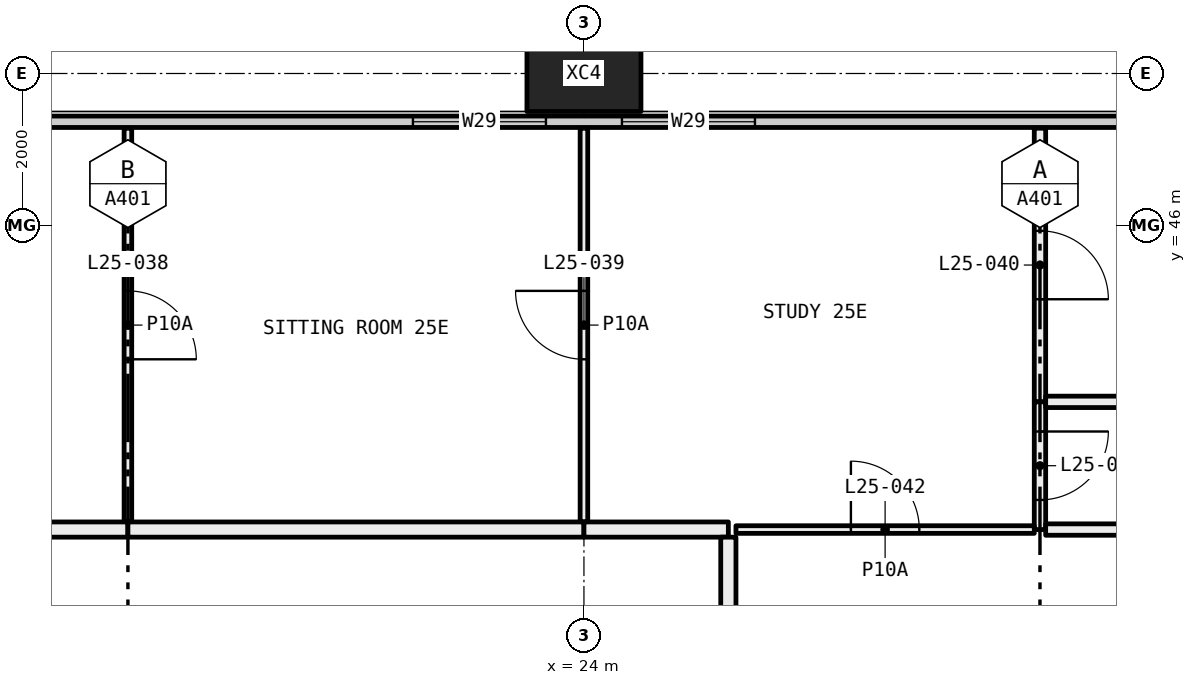
"""IFC4 building model, lengths in metres.
Left out: names, types, materials, properties, quantities, classifications, styles, units other than length and angle.
Written with IfcOpenShell. Run it as: python <this file> out.ifc"""

import sys

from ifc_helpers import new_model, si_unit, direction, frame, frame_2d, origin, origin_2d, place, context, subcontext, project, spatial, rectangle, hollow_rectangle, extrude, element, fill, save


model = new_model("IFC4")
c1 = context("Model", 3, precision=1e-05, world=origin(), true_north=direction((0.0, 1.0)))
c2 = subcontext(c1, "Body", "Model", "MODEL_VIEW")
j1 = project(units=[si_unit("LENGTHUNIT", "METRE"), si_unit("PLANEANGLEUNIT", "RADIAN")], contexts=[c1])
p1 = place(None, origin())
s1 = spatial("IfcSite", under=j1, at=p1, CompositionType="ELEMENT")
p2 = place(p1, origin())
s2 = spatial("IfcBuilding", under=s1, at=p2, CompositionType="ELEMENT")
p3 = place(p2, frame((0.0, 0.0, 100.05)))
s3 = spatial("IfcBuildingStorey", under=s2, at=p3, CompositionType="ELEMENT", Elevation=100.05)
p4 = place(p3, frame((24.0, 48.0, -0.4), z_axis=(0.0, 0.0, 1.0), x_axis=(1.0, 0.0, 0.0)))
e1 = element("IfcColumn", 1, at=p4, inside=s3, PredefinedType="COLUMN", context=c2, shape_type="SweptSolid", body=[
    extrude(hollow_rectangle(XDim=1.5, YDim=1.0, WallThickness=0.06, at=origin_2d()), origin(), (0.0, 0.0, 1.0), 3.45),
])
p5 = place(p3, frame((6.56, 47.365, 0.0), z_axis=(0.0, 0.0, 1.0), x_axis=(1.0, 0.0, 0.0)))
e2 = element("IfcWall", 2, at=p5, inside=s3, PredefinedType="ELEMENTEDWALL", context=c2, shape_type="SweptSolid", body=[
    extrude(rectangle(XDim=58.88, YDim=0.15, at=frame_2d((29.44, 0.0))), origin(), (0.0, 0.0, 1.0), 3.05),
])
p6 = place(p5, frame((0.44, 0.0, 0.45)))
e3 = element("IfcOpeningElement", 3, at=p6, cuts=e2, PredefinedType="OPENING", context=c2, shape_type="SweptSolid", body=[
    extrude(rectangle(XDim=4.5, YDim=2.55, at=frame_2d((2.25, 1.275))), frame((0.0, 0.085, 0.0), z_axis=(0.0, -1.0, 0.0), x_axis=(1.0, 0.0, 0.0)), (0.0, 0.0, 1.0), 0.17),
])
p7 = place(p5, frame((5.94, 0.0, 0.45)))
e4 = element("IfcOpeningElement", 4, at=p7, cuts=e2, PredefinedType="OPENING", context=c2, shape_type="SweptSolid", body=[
    extrude(rectangle(XDim=1.75, YDim=2.55, at=frame_2d((0.875, 1.275))), frame((0.0, 0.085, 0.0), z_axis=(0.0, -1.0, 0.0), x_axis=(1.0, 0.0, 0.0)), (0.0, 0.0, 1.0), 0.17),
])
p8 = place(p5, frame((15.19, 0.0, 0.45)))
e5 = element("IfcOpeningElement", 5, at=p8, cuts=e2, PredefinedType="OPENING", context=c2, shape_type="SweptSolid", body=[
    extrude(rectangle(XDim=1.75, YDim=2.55, at=frame_2d((0.875, 1.275))), frame((0.0, 0.085, 0.0), z_axis=(0.0, -1.0, 0.0), x_axis=(1.0, 0.0, 0.0)), (0.0, 0.0, 1.0), 0.17),
])
p9 = place(p5, frame((17.94, 0.0, 0.45)))
e6 = element("IfcOpeningElement", 6, at=p9, cuts=e2, PredefinedType="OPENING", context=c2, shape_type="SweptSolid", body=[
    extrude(rectangle(XDim=1.75, YDim=2.55, at=frame_2d((0.875, 1.275))), frame((0.0, 0.085, 0.0), z_axis=(0.0, -1.0, 0.0), x_axis=(1.0, 0.0, 0.0)), (0.0, 0.0, 1.0), 0.17),
])
p10 = place(p5, frame((27.19, 0.0, 0.45)))
e7 = element("IfcOpeningElement", 7, at=p10, cuts=e2, PredefinedType="OPENING", context=c2, shape_type="SweptSolid", body=[
    extrude(rectangle(XDim=1.75, YDim=2.55, at=frame_2d((0.875, 1.275))), frame((0.0, 0.085, 0.0), z_axis=(0.0, -1.0, 0.0), x_axis=(1.0, 0.0, 0.0)), (0.0, 0.0, 1.0), 0.17),
])
p11 = place(p5, frame((29.94, 0.0, 0.45)))
e8 = element("IfcOpeningElement", 8, at=p11, cuts=e2, PredefinedType="OPENING", context=c2, shape_type="SweptSolid", body=[
    extrude(rectangle(XDim=1.75, YDim=2.55, at=frame_2d((0.875, 1.275))), frame((0.0, 0.085, 0.0), z_axis=(0.0, -1.0, 0.0), x_axis=(1.0, 0.0, 0.0)), (0.0, 0.0, 1.0), 0.17),
])
p12 = place(p5, frame((39.19, 0.0, 0.45)))
e9 = element("IfcOpeningElement", 9, at=p12, cuts=e2, PredefinedType="OPENING", context=c2, shape_type="SweptSolid", body=[
    extrude(rectangle(XDim=1.75, YDim=2.55, at=frame_2d((0.875, 1.275))), frame((0.0, 0.085, 0.0), z_axis=(0.0, -1.0, 0.0), x_axis=(1.0, 0.0, 0.0)), (0.0, 0.0, 1.0), 0.17),
])
p13 = place(p5, frame((41.94, 0.0, 0.45)))
e10 = element("IfcOpeningElement", 10, at=p13, cuts=e2, PredefinedType="OPENING", context=c2, shape_type="SweptSolid", body=[
    extrude(rectangle(XDim=1.75, YDim=2.55, at=frame_2d((0.875, 1.275))), frame((0.0, 0.085, 0.0), z_axis=(0.0, -1.0, 0.0), x_axis=(1.0, 0.0, 0.0)), (0.0, 0.0, 1.0), 0.17),
])
p14 = place(p5, frame((51.19, 0.0, 0.45)))
e11 = element("IfcOpeningElement", 11, at=p14, cuts=e2, PredefinedType="OPENING", context=c2, shape_type="SweptSolid", body=[
    extrude(rectangle(XDim=1.75, YDim=2.55, at=frame_2d((0.875, 1.275))), frame((0.0, 0.085, 0.0), z_axis=(0.0, -1.0, 0.0), x_axis=(1.0, 0.0, 0.0)), (0.0, 0.0, 1.0), 0.17),
])
p15 = place(p5, frame((53.94, 0.0, 0.45)))
e12 = element("IfcOpeningElement", 12, at=p15, cuts=e2, PredefinedType="OPENING", context=c2, shape_type="SweptSolid", body=[
    extrude(rectangle(XDim=4.5, YDim=2.55, at=frame_2d((2.25, 1.275))), frame((0.0, 0.085, 0.0), z_axis=(0.0, -1.0, 0.0), x_axis=(1.0, 0.0, 0.0)), (0.0, 0.0, 1.0), 0.17),
])
p16 = place(p3, frame((18.0, 42.1, 0.0), z_axis=(0.0, 0.0, 1.0), x_axis=(0.0, 1.0, 0.0)))
e13 = element("IfcWall", 13, at=p16, inside=s3, PredefinedType="PARTITIONING", context=c2, shape_type="SweptSolid", body=[
    extrude(rectangle(XDim=5.18, YDim=0.1, at=frame_2d((2.59, 0.0))), origin(), (0.0, 0.0, 1.0), 3.05),
])
p17 = place(p16, frame((2.14, 0.0, 0.0)))
e14 = element("IfcOpeningElement", 14, at=p17, cuts=e13, PredefinedType="OPENING", context=c2, shape_type="SweptSolid", body=[
    extrude(rectangle(XDim=0.9, YDim=2.1, at=frame_2d((0.45, 1.05))), frame((0.0, 0.06, 0.0), z_axis=(0.0, -1.0, 0.0), x_axis=(1.0, 0.0, 0.0)), (0.0, 0.0, 1.0), 0.12),
])
p18 = place(p3, frame((12.0, 42.0, 0.0), z_axis=(0.0, 0.0, 1.0), x_axis=(1.0, 0.0, 0.0)))
e15 = element("IfcWall", 15, at=p18, inside=s3, PredefinedType="PARTITIONING", context=c2, shape_type="SweptSolid", body=[
    extrude(rectangle(XDim=6.0, YDim=0.2, at=frame_2d((3.0, 0.0))), origin(), (0.0, 0.0, 1.0), 3.05),
])
p19 = place(p18, frame((2.5, 0.0, 0.0)))
e16 = element("IfcOpeningElement", 16, at=p19, cuts=e15, PredefinedType="OPENING", context=c2, shape_type="SweptSolid", body=[
    extrude(rectangle(XDim=1.0, YDim=2.1, at=frame_2d((0.5, 1.05))), frame((0.0, 0.11, 0.0), z_axis=(0.0, -1.0, 0.0), x_axis=(1.0, 0.0, 0.0)), (0.0, 0.0, 1.0), 0.22),
])
p20 = place(p3, frame((24.0, 42.1, 0.0), z_axis=(0.0, 0.0, 1.0), x_axis=(0.0, 1.0, 0.0)))
e17 = element("IfcWall", 17, at=p20, inside=s3, PredefinedType="PARTITIONING", context=c2, shape_type="SweptSolid", body=[
    extrude(rectangle(XDim=5.18, YDim=0.1, at=frame_2d((2.59, 0.0))), origin(), (0.0, 0.0, 1.0), 3.05),
])
p21 = place(p20, frame((2.14, 0.0, 0.0)))
e18 = element("IfcOpeningElement", 18, at=p21, cuts=e17, PredefinedType="OPENING", context=c2, shape_type="SweptSolid", body=[
    extrude(rectangle(XDim=0.9, YDim=2.1, at=frame_2d((0.45, 1.05))), frame((0.0, 0.06, 0.0), z_axis=(0.0, -1.0, 0.0), x_axis=(1.0, 0.0, 0.0)), (0.0, 0.0, 1.0), 0.12),
])
p22 = place(p3, frame((18.0, 42.0, 0.0), z_axis=(0.0, 0.0, 1.0), x_axis=(1.0, 0.0, 0.0)))
e19 = element("IfcWall", 19, at=p22, inside=s3, PredefinedType="PARTITIONING", context=c2, shape_type="SweptSolid", body=[
    extrude(rectangle(XDim=6.0, YDim=0.2, at=frame_2d((3.0, 0.0))), origin(), (0.0, 0.0, 1.0), 3.05),
])
p23 = place(p3, frame((30.0, 43.68, 0.0), z_axis=(0.0, 0.0, 1.0), x_axis=(0.0, 1.0, 0.0)))
e20 = element("IfcWall", 20, at=p23, inside=s3, PredefinedType="PARTITIONING", context=c2, shape_type="SweptSolid", body=[
    extrude(rectangle(XDim=3.6, YDim=0.15, at=frame_2d((1.8, 0.0))), origin(), (0.0, 0.0, 1.0), 3.05),
])
p24 = place(p23, frame((1.35, 0.0, 0.0)))
e21 = element("IfcOpeningElement", 21, at=p24, cuts=e20, PredefinedType="OPENING", context=c2, shape_type="SweptSolid", body=[
    extrude(rectangle(XDim=0.9, YDim=2.1, at=frame_2d((0.45, 1.05))), frame((0.0, 0.085, 0.0), z_axis=(0.0, -1.0, 0.0), x_axis=(1.0, 0.0, 0.0)), (0.0, 0.0, 1.0), 0.17),
])
p25 = place(p3, frame((30.0, 42.0, 0.0), z_axis=(0.0, 0.0, 1.0), x_axis=(0.0, 1.0, 0.0)))
e22 = element("IfcWall", 22, at=p25, inside=s3, PredefinedType="PARTITIONING", context=c2, shape_type="SweptSolid", body=[
    extrude(rectangle(XDim=1.68, YDim=0.15, at=frame_2d((0.84, 0.0))), origin(), (0.0, 0.0, 1.0), 3.05),
])
p26 = place(p25, frame((0.39, 0.0, 0.0)))
e23 = element("IfcOpeningElement", 23, at=p26, cuts=e22, PredefinedType="OPENING", context=c2, shape_type="SweptSolid", body=[
    extrude(rectangle(XDim=0.9, YDim=2.1, at=frame_2d((0.45, 1.05))), frame((0.0, 0.085, 0.0), z_axis=(0.0, -1.0, 0.0), x_axis=(1.0, 0.0, 0.0)), (0.0, 0.0, 1.0), 0.17),
])
p27 = place(p3, frame((26.0, 42.0, 0.0), z_axis=(0.0, 0.0, 1.0), x_axis=(1.0, 0.0, 0.0)))
e24 = element("IfcWall", 24, at=p27, inside=s3, PredefinedType="PARTITIONING", context=c2, shape_type="SweptSolid", body=[
    extrude(rectangle(XDim=3.925, YDim=0.1, at=frame_2d((1.962, 0.0))), origin(), (0.0, 0.0, 1.0), 3.05),
])
p28 = place(p27, frame((1.512, 0.0, 0.0)))
e25 = element("IfcOpeningElement", 25, at=p28, cuts=e24, PredefinedType="OPENING", context=c2, shape_type="SweptSolid", body=[
    extrude(rectangle(XDim=0.9, YDim=2.1, at=frame_2d((0.45, 1.05))), frame((0.0, 0.06, 0.0), z_axis=(0.0, -1.0, 0.0), x_axis=(1.0, 0.0, 0.0)), (0.0, 0.0, 1.0), 0.12),
])
p29 = place(p3, frame((24.0, 42.0, 0.0), z_axis=(0.0, 0.0, 1.0), x_axis=(1.0, 0.0, 0.0)))
e26 = element("IfcWall", 26, at=p29, inside=s3, PredefinedType="PARTITIONING", context=c2, shape_type="SweptSolid", body=[
    extrude(rectangle(XDim=1.9, YDim=0.2, at=frame_2d((0.95, 0.0))), origin(), (0.0, 0.0, 1.0), 3.05),
])
p30 = place(p3, frame((30.075, 43.68, 0.0), z_axis=(0.0, 0.0, 1.0), x_axis=(1.0, 0.0, 0.0)))
e27 = element("IfcWall", 27, at=p30, inside=s3, PredefinedType="PARTITIONING", context=c2, shape_type="SweptSolid", body=[
    extrude(rectangle(XDim=5.925, YDim=0.15, at=frame_2d((2.962, 0.0))), origin(), (0.0, 0.0, 1.0), 2.45),
])
p31 = place(p3, frame((30.075, 42.0, 0.0), z_axis=(0.0, 0.0, 1.0), x_axis=(1.0, 0.0, 0.0)))
e28 = element("IfcWall", 28, at=p31, inside=s3, PredefinedType="PARTITIONING", context=c2, shape_type="SweptSolid", body=[
    extrude(rectangle(XDim=1.425, YDim=0.15, at=frame_2d((0.712, 0.0))), origin(), (0.0, 0.0, 1.0), 3.05),
])
p32 = place(p3, frame((25.9, 41.9, 0.0), z_axis=(0.0, 0.0, 1.0), x_axis=(0.0, -1.0, 0.0)))
e29 = element("IfcWall", 29, at=p32, inside=s3, PredefinedType="PARTITIONING", context=c2, shape_type="SweptSolid", body=[
    extrude(rectangle(XDim=6.2, YDim=0.2, at=frame_2d((3.1, 0.0))), origin(), (0.0, 0.0, 1.0), 2.45),
])
p33 = place(p8, origin())
e30 = element("IfcWindow", 30, at=p33, inside=s3, PartitioningType="SINGLE_PANEL", PredefinedType="WINDOW", context=c2, shape_type="SweptSolid", body=[
    extrude(rectangle(XDim=1.75, YDim=2.55, at=frame_2d((0.875, 1.275))), frame((0.0, 0.03, 0.0), z_axis=(0.0, -1.0, 0.0), x_axis=(1.0, 0.0, 0.0)), (0.0, 0.0, 1.0), 0.06),
])
fill(e5, e30)
p34 = place(p9, origin())
e31 = element("IfcWindow", 31, at=p34, inside=s3, PartitioningType="SINGLE_PANEL", PredefinedType="WINDOW", context=c2, shape_type="SweptSolid", body=[
    extrude(rectangle(XDim=1.75, YDim=2.55, at=frame_2d((0.875, 1.275))), frame((0.0, 0.03, 0.0), z_axis=(0.0, -1.0, 0.0), x_axis=(1.0, 0.0, 0.0)), (0.0, 0.0, 1.0), 0.06),
])
fill(e6, e31)
p35 = place(p17, frame((0.9, 0.0, 0.0), x_axis=(-1.0, 0.0, 0.0)))
e32 = element("IfcDoor", 32, at=p35, inside=s3, OperationType="SINGLE_SWING_LEFT", PredefinedType="DOOR", context=c2, shape_type="SweptSolid", body=[
    extrude(rectangle(XDim=0.9, YDim=2.1, at=frame_2d((0.45, 1.05))), frame((0.0, 0.025, 0.0), z_axis=(0.0, -1.0, 0.0), x_axis=(1.0, 0.0, 0.0)), (0.0, 0.0, 1.0), 0.05),
])
fill(e14, e32)
p36 = place(p21, origin())
e33 = element("IfcDoor", 33, at=p36, inside=s3, OperationType="SINGLE_SWING_LEFT", PredefinedType="DOOR", context=c2, shape_type="SweptSolid", body=[
    extrude(rectangle(XDim=0.9, YDim=2.1, at=frame_2d((0.45, 1.05))), frame((0.0, 0.025, 0.0), z_axis=(0.0, -1.0, 0.0), x_axis=(1.0, 0.0, 0.0)), (0.0, 0.0, 1.0), 0.05),
])
fill(e18, e33)
p37 = place(p24, frame((0.9, 0.0, 0.0), x_axis=(-1.0, 0.0, 0.0)))
e34 = element("IfcDoor", 34, at=p37, inside=s3, OperationType="SINGLE_SWING_LEFT", PredefinedType="DOOR", context=c2, shape_type="SweptSolid", body=[
    extrude(rectangle(XDim=0.9, YDim=2.1, at=frame_2d((0.45, 1.05))), frame((0.0, 0.025, 0.0), z_axis=(0.0, -1.0, 0.0), x_axis=(1.0, 0.0, 0.0)), (0.0, 0.0, 1.0), 0.05),
])
fill(e21, e34)
p38 = place(p26, frame((0.9, 0.0, 0.0), x_axis=(-1.0, 0.0, 0.0)))
e35 = element("IfcDoor", 35, at=p38, inside=s3, OperationType="SINGLE_SWING_RIGHT", PredefinedType="DOOR", context=c2, shape_type="SweptSolid", body=[
    extrude(rectangle(XDim=0.9, YDim=2.1, at=frame_2d((0.45, 1.05))), frame((0.0, 0.025, 0.0), z_axis=(0.0, -1.0, 0.0), x_axis=(1.0, 0.0, 0.0)), (0.0, 0.0, 1.0), 0.05),
])
fill(e23, e35)
p39 = place(p28, origin())
e36 = element("IfcDoor", 36, at=p39, inside=s3, OperationType="SINGLE_SWING_RIGHT", PredefinedType="DOOR", context=c2, shape_type="SweptSolid", body=[
    extrude(rectangle(XDim=0.9, YDim=2.1, at=frame_2d((0.45, 1.05))), frame((0.0, 0.025, 0.0), z_axis=(0.0, -1.0, 0.0), x_axis=(1.0, 0.0, 0.0)), (0.0, 0.0, 1.0), 0.05),
])
fill(e25, e36)
save(model, sys.argv[1])
